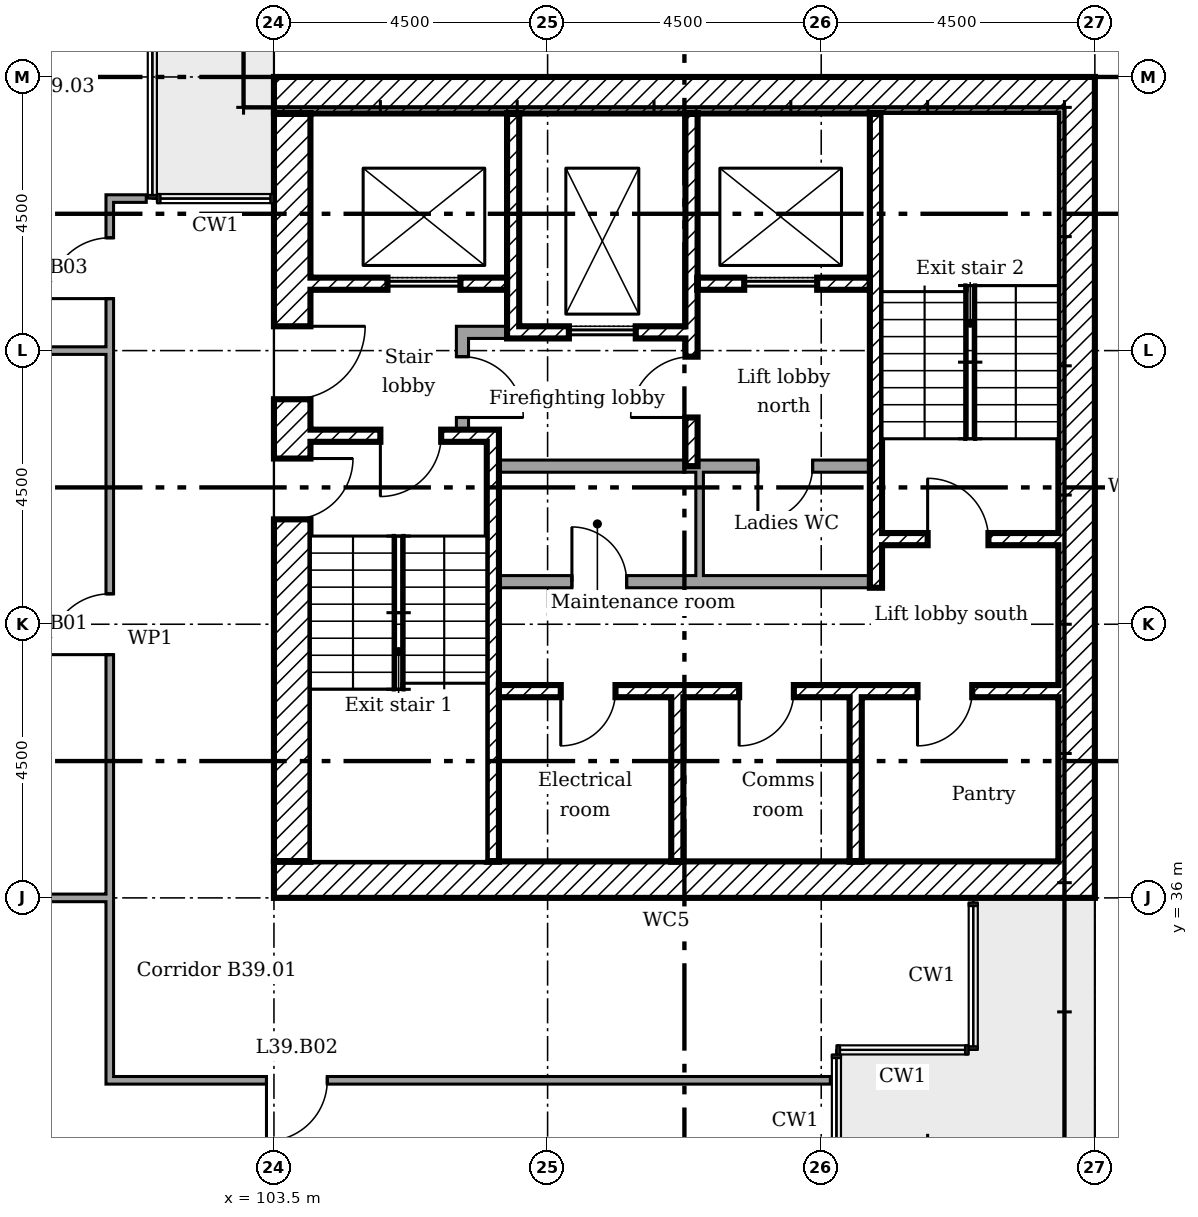
"""IFC4 building model, lengths in metres.
Left out: names, types, materials, properties, quantities, classifications, styles, units other than length and angle.
Written with IfcOpenShell. Run it as: python <this file> out.ifc"""

import sys

from ifc_helpers import new_model, si_unit, direction, frame, frame_2d, origin, place, context, subcontext, project, spatial, rectangle, extrude, element, fill, save


model = new_model("IFC4")
c1 = context("Model", 3, precision=1e-05, world=origin(), true_north=direction((0.0, 1.0)))
c2 = subcontext(c1, "Body", "Model", "MODEL_VIEW")
j1 = project(units=[si_unit("LENGTHUNIT", "METRE"), si_unit("PLANEANGLEUNIT", "RADIAN")], contexts=[c1])
p1 = place(None, origin())
s1 = spatial("IfcSite", under=j1, at=p1, CompositionType="ELEMENT")
p2 = place(p1, origin())
s2 = spatial("IfcBuilding", under=s1, at=p2, CompositionType="ELEMENT")
p3 = place(p2, frame((0.0, 0.0, 158.2)))
s3 = spatial("IfcBuildingStorey", under=s2, at=p3, CompositionType="ELEMENT", Elevation=158.2)
p4 = place(p3, frame((116.7, 36.0, 0.0), z_axis=(0.0, 0.0, 1.0), x_axis=(0.0, 1.0, 0.0)))
e1 = element("IfcWall", 1, at=p4, inside=s3, PredefinedType="SHEAR", context=c2, shape_type="SweptSolid", body=[
    extrude(rectangle(XDim=13.5, YDim=0.6, at=frame_2d((6.75, 0.0))), origin(), (0.0, 0.0, 1.0), 3.35),
])
for number, where in (
    (2, (103.5, 49.2, 0.0)),
    (3, (103.5, 36.3, 0.0)),
):
    element("IfcWall", number, at=place(p3, frame(where)), inside=s3, PredefinedType="SHEAR", context=c2, shape_type="SweptSolid", body=[
        extrude(rectangle(XDim=12.9, YDim=0.6, at=frame_2d((6.45, 0.0))), origin(), (0.0, 0.0, 1.0), 3.35),
    ])
p5 = place(p3, frame((103.8, 36.6, 0.0), z_axis=(0.0, 0.0, 1.0), x_axis=(0.0, 1.0, 0.0)))
e4 = element("IfcWall", 4, at=p5, inside=s3, PredefinedType="SHEAR", context=c2, shape_type="SweptSolid", body=[
    extrude(rectangle(XDim=12.3, YDim=0.6, at=frame_2d((6.15, 0.0))), origin(), (0.0, 0.0, 1.0), 3.35),
])
p6 = place(p5, frame((7.6, 0.0, 0.0)))
e5 = element("IfcOpeningElement", 5, at=p6, cuts=e4, PredefinedType="OPENING", context=c2, shape_type="SweptSolid", body=[
    extrude(rectangle(XDim=1.2, YDim=2.1, at=frame_2d((0.6, 1.05))), frame((0.0, 0.31, 0.0), z_axis=(0.0, -1.0, 0.0), x_axis=(1.0, 0.0, 0.0)), (0.0, 0.0, 1.0), 0.62),
])
p7 = place(p5, frame((5.625, 0.0, 0.0)))
e6 = element("IfcOpeningElement", 6, at=p7, cuts=e4, PredefinedType="OPENING", context=c2, shape_type="SweptSolid", body=[
    extrude(rectangle(XDim=1.0, YDim=2.1, at=frame_2d((0.5, 1.05))), frame((0.0, 0.31, 0.0), z_axis=(0.0, -1.0, 0.0), x_axis=(1.0, 0.0, 0.0)), (0.0, 0.0, 1.0), 0.62),
])
p8 = place(p3, frame((107.433, 48.9, 0.0), z_axis=(0.0, 0.0, 1.0), x_axis=(0.0, -1.0, 0.0)))
e7 = element("IfcWall", 7, at=p8, inside=s3, PredefinedType="SHEAR", context=c2, shape_type="SweptSolid", body=[
    extrude(rectangle(XDim=3.7, YDim=0.2, at=frame_2d((1.85, 0.0))), origin(), (0.0, 0.0, 1.0), 3.35),
])
p9 = place(p3, frame((110.367, 48.9, 0.0), z_axis=(0.0, 0.0, 1.0), x_axis=(0.0, -1.0, 0.0)))
e8 = element("IfcWall", 8, at=p9, inside=s3, PredefinedType="SHEAR", context=c2, shape_type="SweptSolid", body=[
    extrude(rectangle(XDim=5.8, YDim=0.2, at=frame_2d((2.9, 0.0))), origin(), (0.0, 0.0, 1.0), 3.35),
])
p10 = place(p9, frame((4.0, 0.0, 0.0)))
e9 = element("IfcOpeningElement", 9, at=p10, cuts=e8, PredefinedType="OPENING", context=c2, shape_type="SweptSolid", body=[
    extrude(rectangle(XDim=1.0, YDim=2.1, at=frame_2d((0.5, 1.05))), frame((0.0, 0.11, 0.0), z_axis=(0.0, -1.0, 0.0), x_axis=(1.0, 0.0, 0.0)), (0.0, 0.0, 1.0), 0.22),
])
for number, where, z_axis, x_axis in (
    (10, (110.133, 36.6, 0.0), (0.0, 0.0, 1.0), (0.0, 1.0, 0.0)),
    (11, (113.067, 36.6, 0.0), (0.0, 0.0, 1.0), (0.0, 1.0, 0.0)),
):
    element("IfcWall", number, at=place(p3, frame(where, z_axis=z_axis, x_axis=x_axis)), inside=s3, PredefinedType="SHEAR", context=c2, shape_type="SweptSolid", body=[
        extrude(rectangle(XDim=2.7, YDim=0.2, at=frame_2d((1.35, 0.0))), origin(), (0.0, 0.0, 1.0), 3.35),
    ])
p11 = place(p3, frame((106.5, 45.3, 0.0)))
e12 = element("IfcWall", 12, at=p11, inside=s3, PredefinedType="PARTITIONING", context=c2, shape_type="SweptSolid", body=[
    extrude(rectangle(XDim=0.833, YDim=0.2, at=frame_2d((0.417, 0.0))), origin(), (0.0, 0.0, 1.0), 3.35),
])
p12 = place(p3, frame((106.6, 43.7, 0.0), z_axis=(0.0, 0.0, 1.0), x_axis=(0.0, 1.0, 0.0)))
e13 = element("IfcWall", 13, at=p12, inside=s3, PredefinedType="PARTITIONING", context=c2, shape_type="SweptSolid", body=[
    extrude(rectangle(XDim=1.5, YDim=0.2, at=frame_2d((0.75, 0.0))), origin(), (0.0, 0.0, 1.0), 3.35),
])
p13 = place(p12, frame((0.2, 0.0, 0.0)))
e14 = element("IfcOpeningElement", 14, at=p13, cuts=e13, PredefinedType="OPENING", context=c2, shape_type="SweptSolid", body=[
    extrude(rectangle(XDim=1.0, YDim=2.1, at=frame_2d((0.5, 1.05))), frame((0.0, 0.11, 0.0), z_axis=(0.0, -1.0, 0.0), x_axis=(1.0, 0.0, 0.0)), (0.0, 0.0, 1.0), 0.22),
])
p14 = place(p3, frame((104.1, 46.1, 0.0)))
e15 = element("IfcWall", 15, at=p14, inside=s3, PredefinedType="SHEAR", context=c2, shape_type="SweptSolid", body=[
    extrude(rectangle(XDim=3.233, YDim=0.2, at=frame_2d((1.617, 0.0))), origin(), (0.0, 0.0, 1.0), 3.35),
])
p15 = place(p14, frame((1.267, 0.0, 0.0)))
e16 = element("IfcOpeningElement", 16, at=p15, cuts=e15, PredefinedType="OPENING", context=c2, shape_type="SweptSolid", body=[
    extrude(rectangle(XDim=1.2, YDim=2.1, at=frame_2d((0.6, 1.05))), frame((0.0, 0.11, 0.0), z_axis=(0.0, -1.0, 0.0), x_axis=(1.0, 0.0, 0.0)), (0.0, 0.0, 1.0), 0.22),
])
p16 = place(p3, frame((110.467, 46.1, 0.0)))
e17 = element("IfcWall", 17, at=p16, inside=s3, PredefinedType="SHEAR", context=c2, shape_type="SweptSolid", body=[
    extrude(rectangle(XDim=2.833, YDim=0.2, at=frame_2d((1.417, 0.0))), origin(), (0.0, 0.0, 1.0), 3.35),
])
p17 = place(p16, frame((0.767, 0.0, 0.0)))
e18 = element("IfcOpeningElement", 18, at=p17, cuts=e17, PredefinedType="OPENING", context=c2, shape_type="SweptSolid", body=[
    extrude(rectangle(XDim=1.2, YDim=2.1, at=frame_2d((0.6, 1.05))), frame((0.0, 0.11, 0.0), z_axis=(0.0, -1.0, 0.0), x_axis=(1.0, 0.0, 0.0)), (0.0, 0.0, 1.0), 0.22),
])
p18 = place(p3, frame((107.533, 45.3, 0.0)))
e19 = element("IfcWall", 19, at=p18, inside=s3, PredefinedType="SHEAR", context=c2, shape_type="SweptSolid", body=[
    extrude(rectangle(XDim=2.733, YDim=0.2, at=frame_2d((1.367, 0.0))), origin(), (0.0, 0.0, 1.0), 3.35),
])
p19 = place(p18, frame((0.817, 0.0, 0.0)))
e20 = element("IfcOpeningElement", 20, at=p19, cuts=e19, PredefinedType="OPENING", context=c2, shape_type="SweptSolid", body=[
    extrude(rectangle(XDim=1.1, YDim=2.1, at=frame_2d((0.55, 1.05))), frame((0.0, 0.11, 0.0), z_axis=(0.0, -1.0, 0.0), x_axis=(1.0, 0.0, 0.0)), (0.0, 0.0, 1.0), 0.22),
])
p20 = place(p3, frame((107.2, 39.4, 0.0)))
e21 = element("IfcWall", 21, at=p20, inside=s3, PredefinedType="SHEAR", context=c2, shape_type="SweptSolid", body=[
    extrude(rectangle(XDim=9.2, YDim=0.2, at=frame_2d((4.6, 0.0))), origin(), (0.0, 0.0, 1.0), 3.35),
])
p21 = place(p20, frame((1.017, 0.0, 0.0)))
e22 = element("IfcOpeningElement", 22, at=p21, cuts=e21, PredefinedType="OPENING", context=c2, shape_type="SweptSolid", body=[
    extrude(rectangle(XDim=0.9, YDim=2.1, at=frame_2d((0.45, 1.05))), frame((0.0, 0.11, 0.0), z_axis=(0.0, -1.0, 0.0), x_axis=(1.0, 0.0, 0.0)), (0.0, 0.0, 1.0), 0.22),
])
p22 = place(p20, frame((3.95, 0.0, 0.0)))
e23 = element("IfcOpeningElement", 23, at=p22, cuts=e21, PredefinedType="OPENING", context=c2, shape_type="SweptSolid", body=[
    extrude(rectangle(XDim=0.9, YDim=2.1, at=frame_2d((0.45, 1.05))), frame((0.0, 0.11, 0.0), z_axis=(0.0, -1.0, 0.0), x_axis=(1.0, 0.0, 0.0)), (0.0, 0.0, 1.0), 0.22),
])
p23 = place(p20, frame((6.883, 0.0, 0.0)))
e24 = element("IfcOpeningElement", 24, at=p23, cuts=e21, PredefinedType="OPENING", context=c2, shape_type="SweptSolid", body=[
    extrude(rectangle(XDim=0.9, YDim=2.1, at=frame_2d((0.45, 1.05))), frame((0.0, 0.11, 0.0), z_axis=(0.0, -1.0, 0.0), x_axis=(1.0, 0.0, 0.0)), (0.0, 0.0, 1.0), 0.22),
])
p24 = place(p3, frame((107.1, 36.6, 0.0), z_axis=(0.0, 0.0, 1.0), x_axis=(0.0, 1.0, 0.0)))
e25 = element("IfcWall", 25, at=p24, inside=s3, PredefinedType="SHEAR", context=c2, shape_type="SweptSolid", body=[
    extrude(rectangle(XDim=7.1, YDim=0.2, at=frame_2d((3.55, 0.0))), origin(), (0.0, 0.0, 1.0), 3.35),
])
p25 = place(p3, frame((104.1, 43.6, 0.0)))
e26 = element("IfcWall", 26, at=p25, inside=s3, PredefinedType="SHEAR", context=c2, shape_type="SweptSolid", body=[
    extrude(rectangle(XDim=2.9, YDim=0.2, at=frame_2d((1.45, 0.0))), origin(), (0.0, 0.0, 1.0), 3.35),
])
p26 = place(p25, frame((1.15, 0.0, 0.0)))
e27 = element("IfcOpeningElement", 27, at=p26, cuts=e26, PredefinedType="OPENING", context=c2, shape_type="SweptSolid", body=[
    extrude(rectangle(XDim=1.0, YDim=2.1, at=frame_2d((0.5, 1.05))), frame((0.0, 0.11, 0.0), z_axis=(0.0, -1.0, 0.0), x_axis=(1.0, 0.0, 0.0)), (0.0, 0.0, 1.0), 0.22),
])
p27 = place(p3, frame((113.5, 41.9, 0.0)))
e28 = element("IfcWall", 28, at=p27, inside=s3, PredefinedType="SHEAR", context=c2, shape_type="SweptSolid", body=[
    extrude(rectangle(XDim=2.9, YDim=0.2, at=frame_2d((1.45, 0.0))), origin(), (0.0, 0.0, 1.0), 3.35),
])
p28 = place(p27, frame((0.75, 0.0, 0.0)))
e29 = element("IfcOpeningElement", 29, at=p28, cuts=e28, PredefinedType="OPENING", context=c2, shape_type="SweptSolid", body=[
    extrude(rectangle(XDim=1.0, YDim=2.1, at=frame_2d((0.5, 1.05))), frame((0.0, 0.11, 0.0), z_axis=(0.0, -1.0, 0.0), x_axis=(1.0, 0.0, 0.0)), (0.0, 0.0, 1.0), 0.22),
])
p29 = place(p3, frame((113.4, 41.1, 0.0), z_axis=(0.0, 0.0, 1.0), x_axis=(0.0, 1.0, 0.0)))
e30 = element("IfcWall", 30, at=p29, inside=s3, PredefinedType="SHEAR", context=c2, shape_type="SweptSolid", body=[
    extrude(rectangle(XDim=7.8, YDim=0.2, at=frame_2d((3.9, 0.0))), origin(), (0.0, 0.0, 1.0), 3.35),
])
p30 = place(p3, frame((107.2, 43.1, 0.0)))
e31 = element("IfcWall", 31, at=p30, inside=s3, PredefinedType="PARTITIONING", context=c2, shape_type="SweptSolid", body=[
    extrude(rectangle(XDim=6.1, YDim=0.2, at=frame_2d((3.05, 0.0))), origin(), (0.0, 0.0, 1.0), 3.35),
])
p31 = place(p30, frame((4.259, 0.0, 0.0)))
e32 = element("IfcOpeningElement", 32, at=p31, cuts=e31, PredefinedType="OPENING", context=c2, shape_type="SweptSolid", body=[
    extrude(rectangle(XDim=0.9, YDim=2.1, at=frame_2d((0.45, 1.05))), frame((0.0, 0.11, 0.0), z_axis=(0.0, -1.0, 0.0), x_axis=(1.0, 0.0, 0.0)), (0.0, 0.0, 1.0), 0.22),
])
p32 = place(p3, frame((107.2, 41.2, 0.0)))
e33 = element("IfcWall", 33, at=p32, inside=s3, PredefinedType="PARTITIONING", context=c2, shape_type="SweptSolid", body=[
    extrude(rectangle(XDim=6.1, YDim=0.2, at=frame_2d((3.05, 0.0))), origin(), (0.0, 0.0, 1.0), 3.35),
])
p33 = place(p32, frame((1.2, 0.0, 0.0)))
e34 = element("IfcOpeningElement", 34, at=p33, cuts=e33, PredefinedType="OPENING", context=c2, shape_type="SweptSolid", body=[
    extrude(rectangle(XDim=0.9, YDim=2.1, at=frame_2d((0.45, 1.05))), frame((0.0, 0.11, 0.0), z_axis=(0.0, -1.0, 0.0), x_axis=(1.0, 0.0, 0.0)), (0.0, 0.0, 1.0), 0.22),
])
p34 = place(p3, frame((110.5, 41.3, 0.0), z_axis=(0.0, 0.0, 1.0), x_axis=(0.0, 1.0, 0.0)))
e35 = element("IfcWall", 35, at=p34, inside=s3, PredefinedType="PARTITIONING", context=c2, shape_type="SweptSolid", body=[
    extrude(rectangle(XDim=1.7, YDim=0.125, at=frame_2d((0.85, 0.0))), origin(), (0.0, 0.0, 1.0), 3.35),
])
p35 = place(p3, frame((100.738, 33.0, 0.0)))
e36 = element("IfcWall", 36, at=p35, inside=s3, PredefinedType="PARTITIONING", context=c2, shape_type="SweptSolid", body=[
    extrude(rectangle(XDim=11.912, YDim=0.125, at=frame_2d((5.956, 0.0))), origin(), (0.0, 0.0, 1.0), 3.45),
])
p36 = place(p35, frame((2.639, 0.0, 0.0)))
e37 = element("IfcOpeningElement", 37, at=p36, cuts=e36, PredefinedType="OPENING", context=c2, shape_type="SweptSolid", body=[
    extrude(rectangle(XDim=1.0, YDim=2.1, at=frame_2d((0.5, 1.05))), frame((0.0, 0.073, 0.0), z_axis=(0.0, -1.0, 0.0), x_axis=(1.0, 0.0, 0.0)), (0.0, 0.0, 1.0), 0.145),
])
p37 = place(p3, frame((99.35, 36.0, 0.0)))
e38 = element("IfcWall", 38, at=p37, inside=s3, PredefinedType="PARTITIONING", context=c2, shape_type="SweptSolid", body=[
    extrude(rectangle(XDim=1.45, YDim=0.125, at=frame_2d((0.725, 0.0))), origin(), (0.0, 0.0, 1.0), 2.842),
])
p38 = place(p3, frame((96.6, 45.0, 0.0)))
e39 = element("IfcWall", 39, at=p38, inside=s3, PredefinedType="PARTITIONING", context=c2, shape_type="SweptSolid", body=[
    extrude(rectangle(XDim=4.2, YDim=0.125, at=frame_2d((2.1, 0.0))), origin(), (0.0, 0.0, 1.0), 2.851),
])
p39 = place(p3, frame((100.738, 47.5, 0.0)))
e40 = element("IfcWall", 40, at=p39, inside=s3, PredefinedType="PARTITIONING", context=c2, shape_type="SweptSolid", body=[
    extrude(rectangle(XDim=0.662, YDim=0.125, at=frame_2d((0.331, 0.0))), origin(), (0.0, 0.0, 1.0), 3.45),
])
p40 = place(p3, frame((100.8, 33.062, 0.0), z_axis=(0.0, 0.0, 1.0), x_axis=(0.0, 1.0, 0.0)))
e41 = element("IfcWall", 41, at=p40, inside=s3, PredefinedType="PARTITIONING", context=c2, shape_type="SweptSolid", body=[
    extrude(rectangle(XDim=14.375, YDim=0.125, at=frame_2d((7.188, 0.0))), origin(), (0.0, 0.0, 1.0), 3.45),
])
p41 = place(p40, frame((6.938, 0.0, 0.0)))
e42 = element("IfcOpeningElement", 42, at=p41, cuts=e41, PredefinedType="OPENING", context=c2, shape_type="SweptSolid", body=[
    extrude(rectangle(XDim=1.0, YDim=2.1, at=frame_2d((0.5, 1.05))), frame((0.0, 0.073, 0.0), z_axis=(0.0, -1.0, 0.0), x_axis=(1.0, 0.0, 0.0)), (0.0, 0.0, 1.0), 0.145),
])
p42 = place(p40, frame((12.792, 0.0, 0.0)))
e43 = element("IfcOpeningElement", 43, at=p42, cuts=e41, PredefinedType="OPENING", context=c2, shape_type="SweptSolid", body=[
    extrude(rectangle(XDim=1.0, YDim=2.1, at=frame_2d((0.5, 1.05))), frame((0.0, 0.073, 0.0), z_axis=(0.0, -1.0, 0.0), x_axis=(1.0, 0.0, 0.0)), (0.0, 0.0, 1.0), 0.145),
])
p43 = place(p6, frame((1.2, 0.0, 0.0), x_axis=(-1.0, 0.0, 0.0)))
e44 = element("IfcDoor", 44, at=p43, inside=s3, OperationType="SINGLE_SWING_RIGHT", PredefinedType="DOOR", context=c2, shape_type="SweptSolid", body=[
    extrude(rectangle(XDim=1.2, YDim=2.1, at=frame_2d((0.6, 1.05))), frame((0.0, 0.025, 0.0), z_axis=(0.0, -1.0, 0.0), x_axis=(1.0, 0.0, 0.0)), (0.0, 0.0, 1.0), 0.05),
])
fill(e5, e44)
p44 = place(p26, frame((1.0, 0.0, 0.0), x_axis=(-1.0, 0.0, 0.0)))
e45 = element("IfcDoor", 45, at=p44, inside=s3, OperationType="SINGLE_SWING_LEFT", PredefinedType="DOOR", context=c2, shape_type="SweptSolid", body=[
    extrude(rectangle(XDim=1.0, YDim=2.1, at=frame_2d((0.5, 1.05))), frame((0.0, 0.025, 0.0), z_axis=(0.0, -1.0, 0.0), x_axis=(1.0, 0.0, 0.0)), (0.0, 0.0, 1.0), 0.05),
])
fill(e27, e45)
p45 = place(p7, frame((1.0, 0.0, 0.0), x_axis=(-1.0, 0.0, 0.0)))
e46 = element("IfcDoor", 46, at=p45, inside=s3, OperationType="SINGLE_SWING_RIGHT", PredefinedType="DOOR", context=c2, shape_type="SweptSolid", body=[
    extrude(rectangle(XDim=1.0, YDim=2.1, at=frame_2d((0.5, 1.05))), frame((0.0, 0.025, 0.0), z_axis=(0.0, -1.0, 0.0), x_axis=(1.0, 0.0, 0.0)), (0.0, 0.0, 1.0), 0.05),
])
fill(e6, e46)
p46 = place(p28, origin())
e47 = element("IfcDoor", 47, at=p46, inside=s3, OperationType="SINGLE_SWING_RIGHT", PredefinedType="DOOR", context=c2, shape_type="SweptSolid", body=[
    extrude(rectangle(XDim=1.0, YDim=2.1, at=frame_2d((0.5, 1.05))), frame((0.0, 0.025, 0.0), z_axis=(0.0, -1.0, 0.0), x_axis=(1.0, 0.0, 0.0)), (0.0, 0.0, 1.0), 0.05),
])
fill(e29, e47)
p47 = place(p10, frame((1.0, 0.0, 0.0), x_axis=(-1.0, 0.0, 0.0)))
e48 = element("IfcDoor", 48, at=p47, inside=s3, OperationType="SINGLE_SWING_RIGHT", PredefinedType="DOOR", context=c2, shape_type="SweptSolid", body=[
    extrude(rectangle(XDim=1.0, YDim=2.1, at=frame_2d((0.5, 1.05))), frame((0.0, 0.025, 0.0), z_axis=(0.0, -1.0, 0.0), x_axis=(1.0, 0.0, 0.0)), (0.0, 0.0, 1.0), 0.05),
])
fill(e9, e48)
p48 = place(p13, frame((1.0, 0.0, 0.0), x_axis=(-1.0, 0.0, 0.0)))
e49 = element("IfcDoor", 49, at=p48, inside=s3, OperationType="SINGLE_SWING_LEFT", PredefinedType="DOOR", context=c2, shape_type="SweptSolid", body=[
    extrude(rectangle(XDim=1.0, YDim=2.1, at=frame_2d((0.5, 1.05))), frame((0.0, 0.025, 0.0), z_axis=(0.0, -1.0, 0.0), x_axis=(1.0, 0.0, 0.0)), (0.0, 0.0, 1.0), 0.05),
])
fill(e14, e49)
p49 = place(p21, frame((0.9, 0.0, 0.0), x_axis=(-1.0, 0.0, 0.0)))
e50 = element("IfcDoor", 50, at=p49, inside=s3, OperationType="SINGLE_SWING_LEFT", PredefinedType="DOOR", context=c2, shape_type="SweptSolid", body=[
    extrude(rectangle(XDim=0.9, YDim=2.1, at=frame_2d((0.45, 1.05))), frame((0.0, 0.025, 0.0), z_axis=(0.0, -1.0, 0.0), x_axis=(1.0, 0.0, 0.0)), (0.0, 0.0, 1.0), 0.05),
])
fill(e22, e50)
p50 = place(p22, frame((0.9, 0.0, 0.0), x_axis=(-1.0, 0.0, 0.0)))
e51 = element("IfcDoor", 51, at=p50, inside=s3, OperationType="SINGLE_SWING_LEFT", PredefinedType="DOOR", context=c2, shape_type="SweptSolid", body=[
    extrude(rectangle(XDim=0.9, YDim=2.1, at=frame_2d((0.45, 1.05))), frame((0.0, 0.025, 0.0), z_axis=(0.0, -1.0, 0.0), x_axis=(1.0, 0.0, 0.0)), (0.0, 0.0, 1.0), 0.05),
])
fill(e23, e51)
p51 = place(p23, frame((0.9, 0.0, 0.0), x_axis=(-1.0, 0.0, 0.0)))
e52 = element("IfcDoor", 52, at=p51, inside=s3, OperationType="SINGLE_SWING_LEFT", PredefinedType="DOOR", context=c2, shape_type="SweptSolid", body=[
    extrude(rectangle(XDim=0.9, YDim=2.1, at=frame_2d((0.45, 1.05))), frame((0.0, 0.025, 0.0), z_axis=(0.0, -1.0, 0.0), x_axis=(1.0, 0.0, 0.0)), (0.0, 0.0, 1.0), 0.05),
])
fill(e24, e52)
p52 = place(p33, origin())
e53 = element("IfcDoor", 53, at=p52, inside=s3, OperationType="SINGLE_SWING_RIGHT", PredefinedType="DOOR", context=c2, shape_type="SweptSolid", body=[
    extrude(rectangle(XDim=0.9, YDim=2.1, at=frame_2d((0.45, 1.05))), frame((0.0, 0.025, 0.0), z_axis=(0.0, -1.0, 0.0), x_axis=(1.0, 0.0, 0.0)), (0.0, 0.0, 1.0), 0.05),
])
fill(e34, e53)
p53 = place(p31, frame((0.9, 0.0, 0.0), x_axis=(-1.0, 0.0, 0.0)))
e54 = element("IfcDoor", 54, at=p53, inside=s3, OperationType="SINGLE_SWING_LEFT", PredefinedType="DOOR", context=c2, shape_type="SweptSolid", body=[
    extrude(rectangle(XDim=0.9, YDim=2.1, at=frame_2d((0.45, 1.05))), frame((0.0, 0.025, 0.0), z_axis=(0.0, -1.0, 0.0), x_axis=(1.0, 0.0, 0.0)), (0.0, 0.0, 1.0), 0.05),
])
fill(e32, e54)
p54 = place(p19, origin())
e55 = element("IfcDoor", 55, at=p54, inside=s3, OperationType="SLIDING_TO_LEFT", PredefinedType="DOOR", context=c2, shape_type="SweptSolid", body=[
    extrude(rectangle(XDim=1.1, YDim=2.1, at=frame_2d((0.55, 1.05))), frame((0.0, 0.025, 0.0), z_axis=(0.0, -1.0, 0.0), x_axis=(1.0, 0.0, 0.0)), (0.0, 0.0, 1.0), 0.05),
])
fill(e20, e55)
p55 = place(p15, origin())
e56 = element("IfcDoor", 56, at=p55, inside=s3, OperationType="SLIDING_TO_LEFT", PredefinedType="DOOR", context=c2, shape_type="SweptSolid", body=[
    extrude(rectangle(XDim=1.2, YDim=2.1, at=frame_2d((0.6, 1.05))), frame((0.0, 0.025, 0.0), z_axis=(0.0, -1.0, 0.0), x_axis=(1.0, 0.0, 0.0)), (0.0, 0.0, 1.0), 0.05),
])
fill(e16, e56)
p56 = place(p17, origin())
e57 = element("IfcDoor", 57, at=p56, inside=s3, OperationType="SLIDING_TO_LEFT", PredefinedType="DOOR", context=c2, shape_type="SweptSolid", body=[
    extrude(rectangle(XDim=1.2, YDim=2.1, at=frame_2d((0.6, 1.05))), frame((0.0, 0.025, 0.0), z_axis=(0.0, -1.0, 0.0), x_axis=(1.0, 0.0, 0.0)), (0.0, 0.0, 1.0), 0.05),
])
fill(e18, e57)
p57 = place(p41, origin())
e58 = element("IfcDoor", 58, at=p57, inside=s3, OperationType="SINGLE_SWING_RIGHT", PredefinedType="DOOR", context=c2, shape_type="SweptSolid", body=[
    extrude(rectangle(XDim=1.0, YDim=2.1, at=frame_2d((0.5, 1.05))), frame((0.0, 0.025, 0.0), z_axis=(0.0, -1.0, 0.0), x_axis=(1.0, 0.0, 0.0)), (0.0, 0.0, 1.0), 0.05),
])
fill(e42, e58)
p58 = place(p36, frame((1.0, 0.0, 0.0), x_axis=(-1.0, 0.0, 0.0)))
e59 = element("IfcDoor", 59, at=p58, inside=s3, OperationType="SINGLE_SWING_LEFT", PredefinedType="DOOR", context=c2, shape_type="SweptSolid", body=[
    extrude(rectangle(XDim=1.0, YDim=2.1, at=frame_2d((0.5, 1.05))), frame((0.0, 0.025, 0.0), z_axis=(0.0, -1.0, 0.0), x_axis=(1.0, 0.0, 0.0)), (0.0, 0.0, 1.0), 0.05),
])
fill(e37, e59)
p59 = place(p42, origin())
e60 = element("IfcDoor", 60, at=p59, inside=s3, OperationType="SINGLE_SWING_RIGHT", PredefinedType="DOOR", context=c2, shape_type="SweptSolid", body=[
    extrude(rectangle(XDim=1.0, YDim=2.1, at=frame_2d((0.5, 1.05))), frame((0.0, 0.025, 0.0), z_axis=(0.0, -1.0, 0.0), x_axis=(1.0, 0.0, 0.0)), (0.0, 0.0, 1.0), 0.05),
])
fill(e43, e60)
save(model, sys.argv[1])
